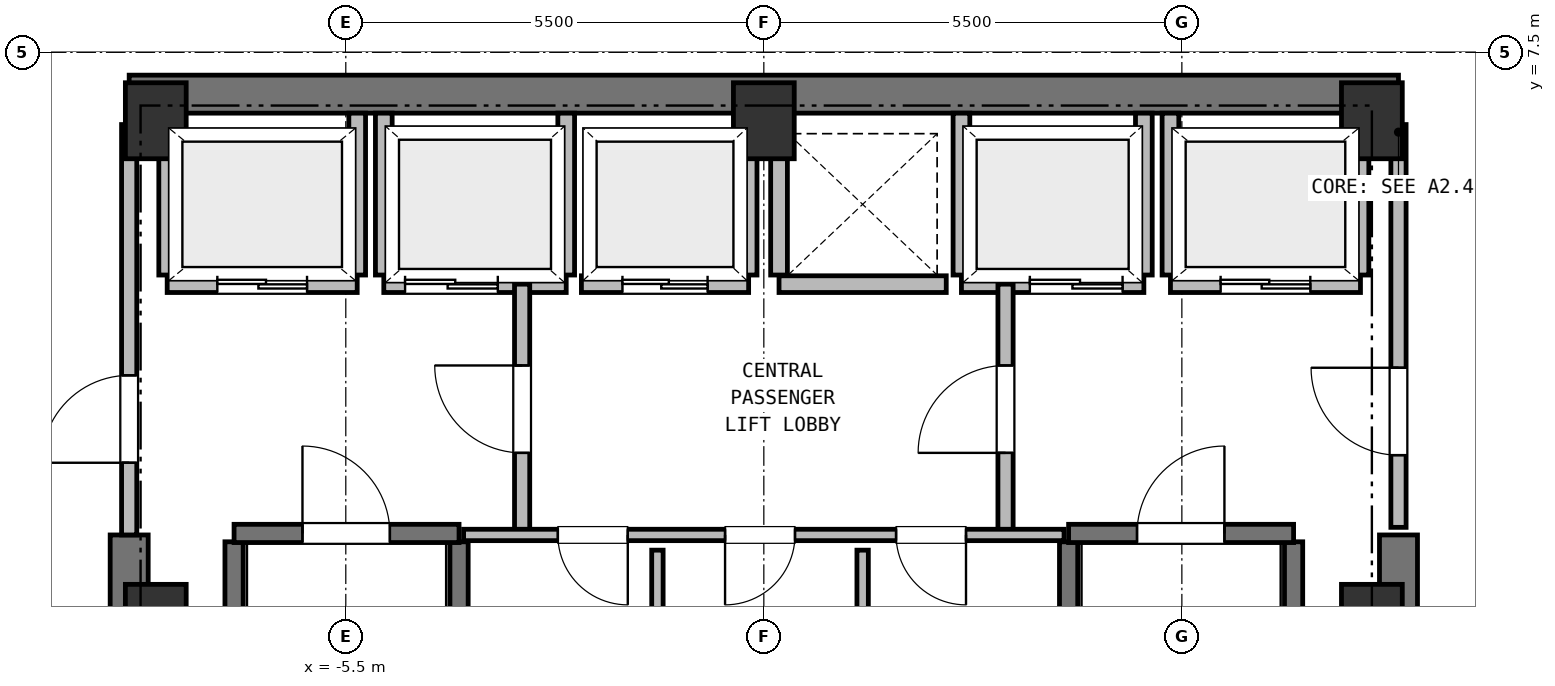
"""IFC4 building model, lengths in metres.
Left out: names, types, materials, properties, quantities, classifications, styles, units other than length and angle.
Written with IfcOpenShell. Run it as: python <this file> out.ifc"""

import sys

from ifc_helpers import new_model, si_unit, direction, frame, frame_2d, origin, origin_2d, place, context, subcontext, project, spatial, rectangle, extrude, element, fill, save


model = new_model("IFC4")
c1 = context("Model", 3, precision=1e-05, world=origin(), true_north=direction((0.0, 1.0)))
c2 = subcontext(c1, "Body", "Model", "MODEL_VIEW")
j1 = project(units=[si_unit("LENGTHUNIT", "METRE"), si_unit("PLANEANGLEUNIT", "RADIAN")], contexts=[c1])
p1 = place(None, origin())
s1 = spatial("IfcSite", under=j1, at=p1, CompositionType="ELEMENT")
p2 = place(p1, origin())
s2 = spatial("IfcBuilding", under=s1, at=p2, CompositionType="ELEMENT")
p3 = place(p2, frame((0.0, 0.0, 178.25)))
s3 = spatial("IfcBuildingStorey", under=s2, at=p3, CompositionType="ELEMENT", Elevation=178.25)
for number, where, z_axis, x_axis in (
    (1, (8.0, 0.0, 0.0), (0.0, 0.0, 1.0), (1.0, 0.0, 0.0)),
    (2, (8.0, 6.6, 0.0), (0.0, 0.0, 1.0), (1.0, 0.0, 0.0)),
    (3, (0.0, 6.6, 0.0), (0.0, 0.0, 1.0), (1.0, 0.0, 0.0)),
    (4, (-8.0, 6.6, 0.0), (0.0, 0.0, 1.0), (1.0, 0.0, 0.0)),
    (5, (-8.0, 0.0, 0.0), (0.0, 0.0, 1.0), (1.0, 0.0, 0.0)),
):
    element("IfcColumn", number, at=place(p3, frame(where, z_axis=z_axis, x_axis=x_axis)), inside=s3, PredefinedType="COLUMN", context=c2, shape_type="SweptSolid", body=[
        extrude(rectangle(XDim=0.8, YDim=1.0, at=origin_2d()), origin(), (0.0, 0.0, 1.0), 4.5),
    ])
p4 = place(p3, frame((-8.35, 6.95, 0.0), z_axis=(0.0, 0.0, 1.0), x_axis=(1.0, 0.0, 0.0)))
e6 = element("IfcWall", 6, at=p4, inside=s3, PredefinedType="SHEAR", context=c2, shape_type="SweptSolid", body=[
    extrude(rectangle(XDim=16.7, YDim=0.5, at=frame_2d((8.35, 0.0))), origin(), (0.0, 0.0, 1.0), 4.25),
])
for number, where, z_axis, x_axis in (
    (7, (-8.35, -6.95, 0.0), (0.0, 0.0, 1.0), (0.0, 1.0, 0.0)),
    (8, (8.35, -6.95, 0.0), (0.0, 0.0, 1.0), (0.0, 1.0, 0.0)),
):
    element("IfcWall", number, at=place(p3, frame(where, z_axis=z_axis, x_axis=x_axis)), inside=s3, PredefinedType="SHEAR", context=c2, shape_type="SweptSolid", body=[
        extrude(rectangle(XDim=8.1, YDim=0.5, at=frame_2d((4.05, 0.0))), origin(), (0.0, 0.0, 1.0), 4.25),
    ])
for number, where, z_axis, x_axis in (
    (9, (-6.97, -6.16, 0.0), (0.0, 0.0, 1.0), (0.0, 1.0, 0.0)),
    (10, (-4.01, -6.16, 0.0), (0.0, 0.0, 1.0), (0.0, 1.0, 0.0)),
):
    element("IfcWall", number, at=place(p3, frame(where, z_axis=z_axis, x_axis=x_axis)), inside=s3, PredefinedType="SHEAR", context=c2, shape_type="SweptSolid", body=[
        extrude(rectangle(XDim=7.22, YDim=0.24, at=frame_2d((3.61, 0.0))), origin(), (0.0, 0.0, 1.0), 4.25),
    ])
p5 = place(p3, frame((-6.97, 1.17, 0.0), z_axis=(0.0, 0.0, 1.0), x_axis=(1.0, 0.0, 0.0)))
e11 = element("IfcWall", 11, at=p5, inside=s3, PredefinedType="SHEAR", context=c2, shape_type="SweptSolid", body=[
    extrude(rectangle(XDim=2.96, YDim=0.24, at=frame_2d((1.48, 0.0))), origin(), (0.0, 0.0, 1.0), 4.25),
])
p6 = place(p5, frame((0.9, 0.0, 0.0)))
e12 = element("IfcOpeningElement", 12, at=p6, cuts=e11, PredefinedType="OPENING", context=c2, shape_type="SweptSolid", body=[
    extrude(rectangle(XDim=1.15, YDim=2.15, at=frame_2d((0.575, 1.075))), frame((0.0, 0.13, 0.0), z_axis=(0.0, -1.0, 0.0), x_axis=(1.0, 0.0, 0.0)), (0.0, 0.0, 1.0), 0.26),
])
for number, where, z_axis, x_axis in (
    (13, (4.01, -6.16, 0.0), (0.0, 0.0, 1.0), (0.0, 1.0, 0.0)),
    (14, (6.97, -6.16, 0.0), (0.0, 0.0, 1.0), (0.0, 1.0, 0.0)),
):
    element("IfcWall", number, at=place(p3, frame(where, z_axis=z_axis, x_axis=x_axis)), inside=s3, PredefinedType="SHEAR", context=c2, shape_type="SweptSolid", body=[
        extrude(rectangle(XDim=7.22, YDim=0.24, at=frame_2d((3.61, 0.0))), origin(), (0.0, 0.0, 1.0), 4.25),
    ])
p7 = place(p3, frame((4.01, 1.17, 0.0), z_axis=(0.0, 0.0, 1.0), x_axis=(1.0, 0.0, 0.0)))
e15 = element("IfcWall", 15, at=p7, inside=s3, PredefinedType="SHEAR", context=c2, shape_type="SweptSolid", body=[
    extrude(rectangle(XDim=2.96, YDim=0.24, at=frame_2d((1.48, 0.0))), origin(), (0.0, 0.0, 1.0), 4.25),
])
p8 = place(p7, frame((0.9, 0.0, 0.0)))
e16 = element("IfcOpeningElement", 16, at=p8, cuts=e15, PredefinedType="OPENING", context=c2, shape_type="SweptSolid", body=[
    extrude(rectangle(XDim=1.15, YDim=2.15, at=frame_2d((0.575, 1.075))), frame((0.0, 0.13, 0.0), z_axis=(0.0, -1.0, 0.0), x_axis=(1.0, 0.0, 0.0)), (0.0, 0.0, 1.0), 0.26),
])
p9 = place(p3, frame((-7.85, 4.45, 0.0), z_axis=(0.0, 0.0, 1.0), x_axis=(1.0, 0.0, 0.0)))
e17 = element("IfcWall", 17, at=p9, inside=s3, PredefinedType="PARTITIONING", context=c2, shape_type="SweptSolid", body=[
    extrude(rectangle(XDim=2.5, YDim=0.22, at=frame_2d((1.25, 0.0))), origin(), (0.0, 0.0, 1.0), 4.25),
])
p10 = place(p9, frame((0.66, 0.0, 0.0)))
e18 = element("IfcOpeningElement", 18, at=p10, cuts=e17, PredefinedType="OPENING", context=c2, shape_type="SweptSolid", body=[
    extrude(rectangle(XDim=1.18, YDim=2.15, at=frame_2d((0.59, 1.075))), frame((0.0, 0.12, 0.0), z_axis=(0.0, -1.0, 0.0), x_axis=(1.0, 0.0, 0.0)), (0.0, 0.0, 1.0), 0.24),
])
p11 = place(p3, frame((-7.85, 4.57, 0.0), z_axis=(0.0, 0.0, 1.0), x_axis=(0.0, 1.0, 0.0)))
e19 = element("IfcWall", 19, at=p11, inside=s3, PredefinedType="PARTITIONING", context=c2, shape_type="SweptSolid", body=[
    extrude(rectangle(XDim=2.13, YDim=0.22, at=frame_2d((1.065, 0.0))), origin(), (0.0, 0.0, 1.0), 3.88),
])
p12 = place(p3, frame((-5.35, 4.57, 0.0), z_axis=(0.0, 0.0, 1.0), x_axis=(0.0, 1.0, 0.0)))
e20 = element("IfcWall", 20, at=p12, inside=s3, PredefinedType="PARTITIONING", context=c2, shape_type="SweptSolid", body=[
    extrude(rectangle(XDim=2.13, YDim=0.22, at=frame_2d((1.065, 0.0))), origin(), (0.0, 0.0, 1.0), 4.25),
])
p13 = place(p3, frame((5.35, 4.45, 0.0), z_axis=(0.0, 0.0, 1.0), x_axis=(1.0, 0.0, 0.0)))
e21 = element("IfcWall", 21, at=p13, inside=s3, PredefinedType="PARTITIONING", context=c2, shape_type="SweptSolid", body=[
    extrude(rectangle(XDim=2.5, YDim=0.22, at=frame_2d((1.25, 0.0))), origin(), (0.0, 0.0, 1.0), 4.25),
])
p14 = place(p13, frame((0.66, 0.0, 0.0)))
e22 = element("IfcOpeningElement", 22, at=p14, cuts=e21, PredefinedType="OPENING", context=c2, shape_type="SweptSolid", body=[
    extrude(rectangle(XDim=1.18, YDim=2.15, at=frame_2d((0.59, 1.075))), frame((0.0, 0.12, 0.0), z_axis=(0.0, -1.0, 0.0), x_axis=(1.0, 0.0, 0.0)), (0.0, 0.0, 1.0), 0.24),
])
p15 = place(p3, frame((5.35, 4.57, 0.0), z_axis=(0.0, 0.0, 1.0), x_axis=(0.0, 1.0, 0.0)))
e23 = element("IfcWall", 23, at=p15, inside=s3, PredefinedType="PARTITIONING", context=c2, shape_type="SweptSolid", body=[
    extrude(rectangle(XDim=2.13, YDim=0.22, at=frame_2d((1.065, 0.0))), origin(), (0.0, 0.0, 1.0), 4.25),
])
p16 = place(p3, frame((7.85, 4.57, 0.0), z_axis=(0.0, 0.0, 1.0), x_axis=(0.0, 1.0, 0.0)))
e24 = element("IfcWall", 24, at=p16, inside=s3, PredefinedType="PARTITIONING", context=c2, shape_type="SweptSolid", body=[
    extrude(rectangle(XDim=2.13, YDim=0.22, at=frame_2d((1.065, 0.0))), origin(), (0.0, 0.0, 1.0), 3.88),
])
p17 = place(p3, frame((-5.0, 4.45, 0.0), z_axis=(0.0, 0.0, 1.0), x_axis=(1.0, 0.0, 0.0)))
e25 = element("IfcWall", 25, at=p17, inside=s3, PredefinedType="PARTITIONING", context=c2, shape_type="SweptSolid", body=[
    extrude(rectangle(XDim=2.4, YDim=0.22, at=frame_2d((1.2, 0.0))), origin(), (0.0, 0.0, 1.0), 4.25),
])
p18 = place(p17, frame((0.28, 0.0, 0.0)))
e26 = element("IfcOpeningElement", 26, at=p18, cuts=e25, PredefinedType="OPENING", context=c2, shape_type="SweptSolid", body=[
    extrude(rectangle(XDim=1.22, YDim=2.15, at=frame_2d((0.61, 1.075))), frame((0.0, 0.12, 0.0), z_axis=(0.0, -1.0, 0.0), x_axis=(1.0, 0.0, 0.0)), (0.0, 0.0, 1.0), 0.24),
])
for number, where, z_axis, x_axis in (
    (27, (-5.0, 4.57, 0.0), (0.0, 0.0, 1.0), (0.0, 1.0, 0.0)),
    (28, (-2.6, 4.57, 0.0), (0.0, 0.0, 1.0), (0.0, 1.0, 0.0)),
):
    element("IfcWall", number, at=place(p3, frame(where, z_axis=z_axis, x_axis=x_axis)), inside=s3, PredefinedType="PARTITIONING", context=c2, shape_type="SweptSolid", body=[
        extrude(rectangle(XDim=2.13, YDim=0.22, at=frame_2d((1.065, 0.0))), origin(), (0.0, 0.0, 1.0), 4.25),
    ])
p19 = place(p3, frame((2.6, 4.45, 0.0), z_axis=(0.0, 0.0, 1.0), x_axis=(1.0, 0.0, 0.0)))
e29 = element("IfcWall", 29, at=p19, inside=s3, PredefinedType="PARTITIONING", context=c2, shape_type="SweptSolid", body=[
    extrude(rectangle(XDim=2.4, YDim=0.22, at=frame_2d((1.2, 0.0))), origin(), (0.0, 0.0, 1.0), 4.25),
])
p20 = place(p19, frame((0.9, 0.0, 0.0)))
e30 = element("IfcOpeningElement", 30, at=p20, cuts=e29, PredefinedType="OPENING", context=c2, shape_type="SweptSolid", body=[
    extrude(rectangle(XDim=1.22, YDim=2.15, at=frame_2d((0.61, 1.075))), frame((0.0, 0.12, 0.0), z_axis=(0.0, -1.0, 0.0), x_axis=(1.0, 0.0, 0.0)), (0.0, 0.0, 1.0), 0.24),
])
for number, where, z_axis, x_axis in (
    (31, (2.6, 4.57, 0.0), (0.0, 0.0, 1.0), (0.0, 1.0, 0.0)),
    (32, (5.0, 4.57, 0.0), (0.0, 0.0, 1.0), (0.0, 1.0, 0.0)),
):
    element("IfcWall", number, at=place(p3, frame(where, z_axis=z_axis, x_axis=x_axis)), inside=s3, PredefinedType="PARTITIONING", context=c2, shape_type="SweptSolid", body=[
        extrude(rectangle(XDim=2.13, YDim=0.22, at=frame_2d((1.065, 0.0))), origin(), (0.0, 0.0, 1.0), 4.25),
    ])
p21 = place(p3, frame((-2.4, 4.45, 0.0), z_axis=(0.0, 0.0, 1.0), x_axis=(1.0, 0.0, 0.0)))
e33 = element("IfcWall", 33, at=p21, inside=s3, PredefinedType="PARTITIONING", context=c2, shape_type="SweptSolid", body=[
    extrude(rectangle(XDim=2.2, YDim=0.22, at=frame_2d((1.1, 0.0))), origin(), (0.0, 0.0, 1.0), 4.25),
])
p22 = place(p21, frame((0.54, 0.0, 0.0)))
e34 = element("IfcOpeningElement", 34, at=p22, cuts=e33, PredefinedType="OPENING", context=c2, shape_type="SweptSolid", body=[
    extrude(rectangle(XDim=1.12, YDim=2.15, at=frame_2d((0.56, 1.075))), frame((0.0, 0.12, 0.0), z_axis=(0.0, -1.0, 0.0), x_axis=(1.0, 0.0, 0.0)), (0.0, 0.0, 1.0), 0.24),
])
p23 = place(p3, frame((-0.2, 4.57, 0.0), z_axis=(0.0, 0.0, 1.0), x_axis=(0.0, 1.0, 0.0)))
e35 = element("IfcWall", 35, at=p23, inside=s3, PredefinedType="PARTITIONING", context=c2, shape_type="SweptSolid", body=[
    extrude(rectangle(XDim=2.13, YDim=0.22, at=frame_2d((1.065, 0.0))), origin(), (0.0, 0.0, 1.0), 4.25),
])
p24 = place(p3, frame((0.2, 4.45, 0.0), z_axis=(0.0, 0.0, 1.0), x_axis=(1.0, 0.0, 0.0)))
e36 = element("IfcWall", 36, at=p24, inside=s3, PredefinedType="PARTITIONING", context=c2, shape_type="SweptSolid", body=[
    extrude(rectangle(XDim=2.2, YDim=0.22, at=frame_2d((1.1, 0.0))), origin(), (0.0, 0.0, 1.0), 4.25),
])
p25 = place(p3, frame((0.2, 4.57, 0.0), z_axis=(0.0, 0.0, 1.0), x_axis=(0.0, 1.0, 0.0)))
e37 = element("IfcWall", 37, at=p25, inside=s3, PredefinedType="PARTITIONING", context=c2, shape_type="SweptSolid", body=[
    extrude(rectangle(XDim=2.13, YDim=0.22, at=frame_2d((1.065, 0.0))), origin(), (0.0, 0.0, 1.0), 4.25),
])
p26 = place(p3, frame((-3.18, 1.15, 0.0), z_axis=(0.0, 0.0, 1.0), x_axis=(0.0, 1.0, 0.0)))
e38 = element("IfcWall", 38, at=p26, inside=s3, PredefinedType="PARTITIONING", context=c2, shape_type="SweptSolid", body=[
    extrude(rectangle(XDim=3.3, YDim=0.2, at=frame_2d((1.65, 0.0))), origin(), (0.0, 0.0, 1.0), 4.25),
])
p27 = place(p26, frame((1.08, 0.0, 0.0)))
e39 = element("IfcOpeningElement", 39, at=p27, cuts=e38, PredefinedType="OPENING", context=c2, shape_type="SweptSolid", body=[
    extrude(rectangle(XDim=1.15, YDim=2.15, at=frame_2d((0.575, 1.075))), frame((0.0, 0.11, 0.0), z_axis=(0.0, -1.0, 0.0), x_axis=(1.0, 0.0, 0.0)), (0.0, 0.0, 1.0), 0.22),
])
p28 = place(p3, frame((3.18, 1.15, 0.0), z_axis=(0.0, 0.0, 1.0), x_axis=(0.0, 1.0, 0.0)))
e40 = element("IfcWall", 40, at=p28, inside=s3, PredefinedType="PARTITIONING", context=c2, shape_type="SweptSolid", body=[
    extrude(rectangle(XDim=3.3, YDim=0.2, at=frame_2d((1.65, 0.0))), origin(), (0.0, 0.0, 1.0), 4.25),
])
p29 = place(p28, frame((1.08, 0.0, 0.0)))
e41 = element("IfcOpeningElement", 41, at=p29, cuts=e40, PredefinedType="OPENING", context=c2, shape_type="SweptSolid", body=[
    extrude(rectangle(XDim=1.15, YDim=2.15, at=frame_2d((0.575, 1.075))), frame((0.0, 0.11, 0.0), z_axis=(0.0, -1.0, 0.0), x_axis=(1.0, 0.0, 0.0)), (0.0, 0.0, 1.0), 0.22),
])
p30 = place(p3, frame((-8.35, 1.15, 0.0), z_axis=(0.0, 0.0, 1.0), x_axis=(0.0, 1.0, 0.0)))
e42 = element("IfcWall", 42, at=p30, inside=s3, PredefinedType="PARTITIONING", context=c2, shape_type="SweptSolid", body=[
    extrude(rectangle(XDim=5.4, YDim=0.2, at=frame_2d((2.7, 0.0))), origin(), (0.0, 0.0, 1.0), 4.25),
])
p31 = place(p30, frame((0.95, 0.0, 0.0)))
e43 = element("IfcOpeningElement", 43, at=p31, cuts=e42, PredefinedType="OPENING", context=c2, shape_type="SweptSolid", body=[
    extrude(rectangle(XDim=1.15, YDim=2.15, at=frame_2d((0.575, 1.075))), frame((0.0, 0.11, 0.0), z_axis=(0.0, -1.0, 0.0), x_axis=(1.0, 0.0, 0.0)), (0.0, 0.0, 1.0), 0.22),
])
p32 = place(p3, frame((8.35, 1.25, 0.0), z_axis=(0.0, 0.0, 1.0), x_axis=(0.0, 1.0, 0.0)))
e44 = element("IfcWall", 44, at=p32, inside=s3, PredefinedType="PARTITIONING", context=c2, shape_type="SweptSolid", body=[
    extrude(rectangle(XDim=5.3, YDim=0.2, at=frame_2d((2.65, 0.0))), origin(), (0.0, 0.0, 1.0), 4.25),
])
p33 = place(p32, frame((0.95, 0.0, 0.0)))
e45 = element("IfcOpeningElement", 45, at=p33, cuts=e44, PredefinedType="OPENING", context=c2, shape_type="SweptSolid", body=[
    extrude(rectangle(XDim=1.15, YDim=2.15, at=frame_2d((0.575, 1.075))), frame((0.0, 0.11, 0.0), z_axis=(0.0, -1.0, 0.0), x_axis=(1.0, 0.0, 0.0)), (0.0, 0.0, 1.0), 0.22),
])
p34 = place(p3, frame((3.95, 1.15, 0.0), z_axis=(0.0, 0.0, 1.0), x_axis=(-1.0, 0.0, 0.0)))
e46 = element("IfcWall", 46, at=p34, inside=s3, PredefinedType="PARTITIONING", context=c2, shape_type="SweptSolid", body=[
    extrude(rectangle(XDim=7.9, YDim=0.15, at=frame_2d((3.95, 0.0))), origin(), (0.0, 0.0, 1.0), 4.25),
])
p35 = place(p34, frame((5.74, 0.0, 0.0)))
e47 = element("IfcOpeningElement", 47, at=p35, cuts=e46, PredefinedType="OPENING", context=c2, shape_type="SweptSolid", body=[
    extrude(rectangle(XDim=0.92, YDim=2.05, at=frame_2d((0.46, 1.025))), frame((0.0, 0.085, 0.0), z_axis=(0.0, -1.0, 0.0), x_axis=(1.0, 0.0, 0.0)), (0.0, 0.0, 1.0), 0.17),
])
p36 = place(p34, frame((3.54, 0.0, 0.0)))
e48 = element("IfcOpeningElement", 48, at=p36, cuts=e46, PredefinedType="OPENING", context=c2, shape_type="SweptSolid", body=[
    extrude(rectangle(XDim=0.92, YDim=2.05, at=frame_2d((0.46, 1.025))), frame((0.0, 0.085, 0.0), z_axis=(0.0, -1.0, 0.0), x_axis=(1.0, 0.0, 0.0)), (0.0, 0.0, 1.0), 0.17),
])
p37 = place(p34, frame((1.29, 0.0, 0.0)))
e49 = element("IfcOpeningElement", 49, at=p37, cuts=e46, PredefinedType="OPENING", context=c2, shape_type="SweptSolid", body=[
    extrude(rectangle(XDim=0.92, YDim=2.05, at=frame_2d((0.46, 1.025))), frame((0.0, 0.085, 0.0), z_axis=(0.0, -1.0, 0.0), x_axis=(1.0, 0.0, 0.0)), (0.0, 0.0, 1.0), 0.17),
])
p38 = place(p3, frame((-1.4, -6.58, 0.0), z_axis=(0.0, 0.0, 1.0), x_axis=(0.0, 1.0, 0.0)))
e50 = element("IfcWall", 50, at=p38, inside=s3, PredefinedType="PARTITIONING", context=c2, shape_type="SweptSolid", body=[
    extrude(rectangle(XDim=7.53, YDim=0.15, at=frame_2d((3.765, 0.0))), origin(), (0.0, 0.0, 1.0), 4.25),
])
p39 = place(p3, frame((1.3, -4.08, 0.0), z_axis=(0.0, 0.0, 1.0), x_axis=(0.0, 1.0, 0.0)))
e51 = element("IfcWall", 51, at=p39, inside=s3, PredefinedType="PARTITIONING", context=c2, shape_type="SweptSolid", body=[
    extrude(rectangle(XDim=5.03, YDim=0.15, at=frame_2d((2.515, 0.0))), origin(), (0.0, 0.0, 1.0), 4.25),
])
for number, where, z_axis, x_axis in (
    (52, (8.648, 9.171, 0.0), (0.0, 0.0, 1.0), (0.69, -0.724, 0.0)),
    (53, (-10.422, 7.309, 0.0), (0.0, 0.0, 1.0), (0.69, 0.724, 0.0)),
):
    element("IfcWall", number, at=place(p3, frame(where, z_axis=z_axis, x_axis=x_axis)), inside=s3, PredefinedType="PARTITIONING", context=c2, shape_type="SweptSolid", body=[
        extrude(rectangle(XDim=2.572, YDim=0.15, at=frame_2d((1.286, 0.0))), origin(), (0.0, 0.0, 1.0), 4.25),
    ])
p40 = place(p6, origin())
e54 = element("IfcDoor", 54, at=p40, inside=s3, OperationType="SINGLE_SWING_LEFT", PredefinedType="DOOR", context=c2, shape_type="SweptSolid", body=[
    extrude(rectangle(XDim=1.15, YDim=2.15, at=frame_2d((0.575, 1.075))), frame((0.0, 0.025, 0.0), z_axis=(0.0, -1.0, 0.0), x_axis=(1.0, 0.0, 0.0)), (0.0, 0.0, 1.0), 0.05),
])
fill(e12, e54)
p41 = place(p8, origin())
e55 = element("IfcDoor", 55, at=p41, inside=s3, OperationType="SINGLE_SWING_RIGHT", PredefinedType="DOOR", context=c2, shape_type="SweptSolid", body=[
    extrude(rectangle(XDim=1.15, YDim=2.15, at=frame_2d((0.575, 1.075))), frame((0.0, 0.025, 0.0), z_axis=(0.0, -1.0, 0.0), x_axis=(1.0, 0.0, 0.0)), (0.0, 0.0, 1.0), 0.05),
])
fill(e16, e55)
p42 = place(p10, origin())
e56 = element("IfcDoor", 56, at=p42, inside=s3, OperationType="DOUBLE_DOOR_SLIDING", PredefinedType="DOOR", context=c2, shape_type="SweptSolid", body=[
    extrude(rectangle(XDim=1.18, YDim=2.15, at=frame_2d((0.59, 1.075))), frame((0.0, 0.025, 0.0), z_axis=(0.0, -1.0, 0.0), x_axis=(1.0, 0.0, 0.0)), (0.0, 0.0, 1.0), 0.05),
])
fill(e18, e56)
p43 = place(p14, origin())
e57 = element("IfcDoor", 57, at=p43, inside=s3, OperationType="DOUBLE_DOOR_SLIDING", PredefinedType="DOOR", context=c2, shape_type="SweptSolid", body=[
    extrude(rectangle(XDim=1.18, YDim=2.15, at=frame_2d((0.59, 1.075))), frame((0.0, 0.025, 0.0), z_axis=(0.0, -1.0, 0.0), x_axis=(1.0, 0.0, 0.0)), (0.0, 0.0, 1.0), 0.05),
])
fill(e22, e57)
p44 = place(p18, origin())
e58 = element("IfcDoor", 58, at=p44, inside=s3, OperationType="DOUBLE_DOOR_SLIDING", PredefinedType="DOOR", context=c2, shape_type="SweptSolid", body=[
    extrude(rectangle(XDim=1.22, YDim=2.15, at=frame_2d((0.61, 1.075))), frame((0.0, 0.025, 0.0), z_axis=(0.0, -1.0, 0.0), x_axis=(1.0, 0.0, 0.0)), (0.0, 0.0, 1.0), 0.05),
])
fill(e26, e58)
p45 = place(p20, origin())
e59 = element("IfcDoor", 59, at=p45, inside=s3, OperationType="DOUBLE_DOOR_SLIDING", PredefinedType="DOOR", context=c2, shape_type="SweptSolid", body=[
    extrude(rectangle(XDim=1.22, YDim=2.15, at=frame_2d((0.61, 1.075))), frame((0.0, 0.025, 0.0), z_axis=(0.0, -1.0, 0.0), x_axis=(1.0, 0.0, 0.0)), (0.0, 0.0, 1.0), 0.05),
])
fill(e30, e59)
p46 = place(p22, origin())
e60 = element("IfcDoor", 60, at=p46, inside=s3, OperationType="DOUBLE_DOOR_SLIDING", PredefinedType="DOOR", context=c2, shape_type="SweptSolid", body=[
    extrude(rectangle(XDim=1.12, YDim=2.15, at=frame_2d((0.56, 1.075))), frame((0.0, 0.025, 0.0), z_axis=(0.0, -1.0, 0.0), x_axis=(1.0, 0.0, 0.0)), (0.0, 0.0, 1.0), 0.05),
])
fill(e34, e60)
p47 = place(p27, origin())
e61 = element("IfcDoor", 61, at=p47, inside=s3, OperationType="SINGLE_SWING_RIGHT", PredefinedType="DOOR", context=c2, shape_type="SweptSolid", body=[
    extrude(rectangle(XDim=1.15, YDim=2.15, at=frame_2d((0.575, 1.075))), frame((0.0, 0.025, 0.0), z_axis=(0.0, -1.0, 0.0), x_axis=(1.0, 0.0, 0.0)), (0.0, 0.0, 1.0), 0.05),
])
fill(e39, e61)
p48 = place(p29, origin())
e62 = element("IfcDoor", 62, at=p48, inside=s3, OperationType="SINGLE_SWING_LEFT", PredefinedType="DOOR", context=c2, shape_type="SweptSolid", body=[
    extrude(rectangle(XDim=1.15, YDim=2.15, at=frame_2d((0.575, 1.075))), frame((0.0, 0.025, 0.0), z_axis=(0.0, -1.0, 0.0), x_axis=(1.0, 0.0, 0.0)), (0.0, 0.0, 1.0), 0.05),
])
fill(e41, e62)
p49 = place(p31, origin())
e63 = element("IfcDoor", 63, at=p49, inside=s3, OperationType="SINGLE_SWING_LEFT", PredefinedType="DOOR", context=c2, shape_type="SweptSolid", body=[
    extrude(rectangle(XDim=1.15, YDim=2.15, at=frame_2d((0.575, 1.075))), frame((0.0, 0.025, 0.0), z_axis=(0.0, -1.0, 0.0), x_axis=(1.0, 0.0, 0.0)), (0.0, 0.0, 1.0), 0.05),
])
fill(e43, e63)
p50 = place(p33, origin())
e64 = element("IfcDoor", 64, at=p50, inside=s3, OperationType="SINGLE_SWING_RIGHT", PredefinedType="DOOR", context=c2, shape_type="SweptSolid", body=[
    extrude(rectangle(XDim=1.15, YDim=2.15, at=frame_2d((0.575, 1.075))), frame((0.0, 0.025, 0.0), z_axis=(0.0, -1.0, 0.0), x_axis=(1.0, 0.0, 0.0)), (0.0, 0.0, 1.0), 0.05),
])
fill(e45, e64)
p51 = place(p35, origin())
e65 = element("IfcDoor", 65, at=p51, inside=s3, OperationType="SINGLE_SWING_LEFT", PredefinedType="DOOR", context=c2, shape_type="SweptSolid", body=[
    extrude(rectangle(XDim=0.92, YDim=2.05, at=frame_2d((0.46, 1.025))), frame((0.0, 0.025, 0.0), z_axis=(0.0, -1.0, 0.0), x_axis=(1.0, 0.0, 0.0)), (0.0, 0.0, 1.0), 0.05),
])
fill(e47, e65)
p52 = place(p36, origin())
e66 = element("IfcDoor", 66, at=p52, inside=s3, OperationType="SINGLE_SWING_RIGHT", PredefinedType="DOOR", context=c2, shape_type="SweptSolid", body=[
    extrude(rectangle(XDim=0.92, YDim=2.05, at=frame_2d((0.46, 1.025))), frame((0.0, 0.025, 0.0), z_axis=(0.0, -1.0, 0.0), x_axis=(1.0, 0.0, 0.0)), (0.0, 0.0, 1.0), 0.05),
])
fill(e48, e66)
p53 = place(p37, origin())
e67 = element("IfcDoor", 67, at=p53, inside=s3, OperationType="SINGLE_SWING_LEFT", PredefinedType="DOOR", context=c2, shape_type="SweptSolid", body=[
    extrude(rectangle(XDim=0.92, YDim=2.05, at=frame_2d((0.46, 1.025))), frame((0.0, 0.025, 0.0), z_axis=(0.0, -1.0, 0.0), x_axis=(1.0, 0.0, 0.0)), (0.0, 0.0, 1.0), 0.05),
])
fill(e49, e67)
save(model, sys.argv[1])
